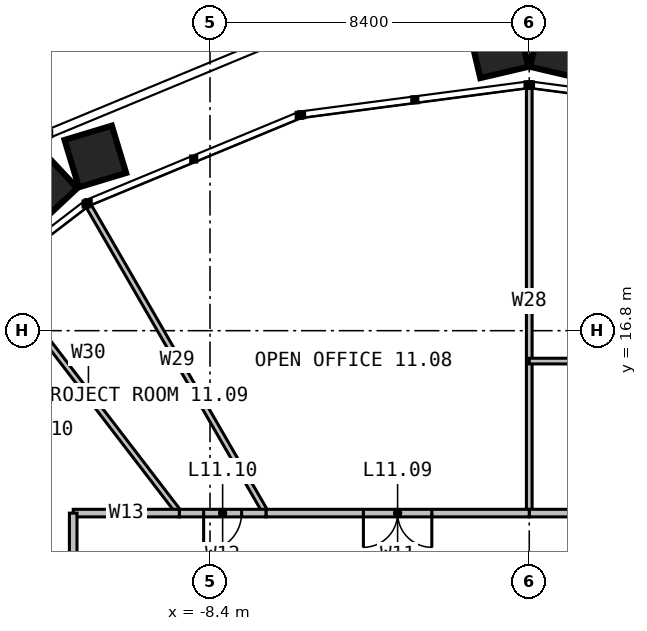
"""IFC4 building model, lengths in metres.
Left out: names, types, materials, properties, quantities, classifications, styles, units other than length and angle.
Written with IfcOpenShell. Run it as: python <this file> out.ifc"""

import sys

from ifc_helpers import new_model, si_unit, direction, frame, frame_2d, origin, place, context, subcontext, project, spatial, rectangle, extrude, element, fill, save


model = new_model("IFC4")
c1 = context("Model", 3, precision=1e-05, world=origin(), true_north=direction((0.0, 1.0)))
c2 = subcontext(c1, "Body", "Model", "MODEL_VIEW")
j1 = project(units=[si_unit("LENGTHUNIT", "METRE"), si_unit("PLANEANGLEUNIT", "RADIAN")], contexts=[c1])
p1 = place(None, origin())
s1 = spatial("IfcSite", under=j1, at=p1, CompositionType="ELEMENT")
p2 = place(p1, origin())
s2 = spatial("IfcBuilding", under=s1, at=p2, CompositionType="ELEMENT")
p3 = place(p2, frame((0.0, 0.0, 49.0)))
s3 = spatial("IfcBuildingStorey", under=s2, at=p3, CompositionType="ELEMENT", Elevation=49.0)
p4 = place(p3, frame((0.0, 12.0, 0.0), z_axis=(0.0, 0.0, 1.0), x_axis=(0.0, 1.0, 0.0)))
e1 = element("IfcWall", 1, at=p4, inside=s3, PredefinedType="PARTITIONING", context=c2, shape_type="SweptSolid", body=[
    extrude(rectangle(XDim=11.18, YDim=0.15, at=frame_2d((5.59, 0.0))), origin(), (0.0, 0.0, 1.0), 2.79),
])
p5 = place(p3, frame((-6.928, 12.0, 0.0), z_axis=(0.0, 0.0, 1.0), x_axis=(-0.499994446179, 0.866028610261, 0.0)))
e2 = element("IfcWall", 2, at=p5, inside=s3, PredefinedType="PARTITIONING", context=c2, shape_type="SweptSolid", body=[
    extrude(rectangle(XDim=9.324, YDim=0.15, at=frame_2d((4.662, 0.0))), origin(), (0.0, 0.0, 1.0), 2.79),
])
p6 = place(p3, frame((-9.208, 12.0, 0.0), z_axis=(0.0, 0.0, 1.0), x_axis=(-0.60875965539, 0.793354701233, 0.0)))
e3 = element("IfcWall", 3, at=p6, inside=s3, PredefinedType="PARTITIONING", context=c2, shape_type="SweptSolid", body=[
    extrude(rectangle(XDim=7.856, YDim=0.15, at=frame_2d((3.928, 0.0))), origin(), (0.0, 0.0, 1.0), 2.79),
])
p7 = place(p3, frame((-12.0, 6.928, 0.0), z_axis=(0.0, 0.0, 1.0), x_axis=(-0.866028610261, 0.499994446179, 0.0)))
e4 = element("IfcWall", 4, at=p7, inside=s3, PredefinedType="PARTITIONING", context=c2, shape_type="SweptSolid", body=[
    extrude(rectangle(XDim=9.324, YDim=0.15, at=frame_2d((4.662, 0.0))), origin(), (0.0, 0.0, 1.0), 2.79),
])
p8 = place(p3, frame((9.238, 16.0, 0.0), z_axis=(0.0, 0.0, 1.0), x_axis=(-1.0, 0.0, 0.0)))
e5 = element("IfcWall", 5, at=p8, inside=s3, PredefinedType="PARTITIONING", context=c2, shape_type="SweptSolid", body=[
    extrude(rectangle(XDim=9.238, YDim=0.15, at=frame_2d((4.619, 0.0))), origin(), (0.0, 0.0, 1.0), 2.79),
])
p9 = place(p8, frame((3.719, 0.0, 0.0)))
e6 = element("IfcOpeningElement", 6, at=p9, cuts=e5, PredefinedType="OPENING", context=c2, shape_type="SweptSolid", body=[
    extrude(rectangle(XDim=1.8, YDim=2.2, at=frame_2d((0.9, 1.1))), frame((0.0, 0.085, 0.0), z_axis=(0.0, -1.0, 0.0), x_axis=(1.0, 0.0, 0.0)), (0.0, 0.0, 1.0), 0.17),
])
p10 = place(p3, frame((6.928, 12.0, 0.0), z_axis=(0.0, 0.0, 1.0), x_axis=(-1.0, 0.0, 0.0)))
e7 = element("IfcWall", 7, at=p10, inside=s3, PredefinedType="PARTITIONING", context=c2, shape_type="SweptSolid", body=[
    extrude(rectangle(XDim=6.928, YDim=0.2, at=frame_2d((3.464, 0.0))), origin(), (0.0, 0.0, 1.0), 3.8),
])
p11 = place(p10, frame((2.964, 0.0, 0.0)))
e8 = element("IfcOpeningElement", 8, at=p11, cuts=e7, PredefinedType="OPENING", context=c2, shape_type="SweptSolid", body=[
    extrude(rectangle(XDim=1.0, YDim=2.2, at=frame_2d((0.5, 1.1))), frame((0.0, 0.11, 0.0), z_axis=(0.0, -1.0, 0.0), x_axis=(1.0, 0.0, 0.0)), (0.0, 0.0, 1.0), 0.22),
])
p12 = place(p3, frame((0.0, 12.0, 0.0), z_axis=(0.0, 0.0, 1.0), x_axis=(-1.0, 0.0, 0.0)))
e9 = element("IfcWall", 9, at=p12, inside=s3, PredefinedType="PARTITIONING", context=c2, shape_type="SweptSolid", body=[
    extrude(rectangle(XDim=6.928, YDim=0.2, at=frame_2d((3.464, 0.0))), origin(), (0.0, 0.0, 1.0), 3.8),
])
p13 = place(p12, frame((2.564, 0.0, 0.0)))
e10 = element("IfcOpeningElement", 10, at=p13, cuts=e9, PredefinedType="OPENING", context=c2, shape_type="SweptSolid", body=[
    extrude(rectangle(XDim=1.8, YDim=2.2, at=frame_2d((0.9, 1.1))), frame((0.0, 0.11, 0.0), z_axis=(0.0, -1.0, 0.0), x_axis=(1.0, 0.0, 0.0)), (0.0, 0.0, 1.0), 0.22),
])
p14 = place(p3, frame((-6.928, 12.0, 0.0), z_axis=(0.0, 0.0, 1.0), x_axis=(-1.0, 0.0, 0.0)))
e11 = element("IfcWall", 11, at=p14, inside=s3, PredefinedType="PARTITIONING", context=c2, shape_type="SweptSolid", body=[
    extrude(rectangle(XDim=2.28, YDim=0.2, at=frame_2d((1.14, 0.0))), origin(), (0.0, 0.0, 1.0), 3.8),
])
p15 = place(p14, frame((0.64, 0.0, 0.0)))
e12 = element("IfcOpeningElement", 12, at=p15, cuts=e11, PredefinedType="OPENING", context=c2, shape_type="SweptSolid", body=[
    extrude(rectangle(XDim=1.0, YDim=2.2, at=frame_2d((0.5, 1.1))), frame((0.0, 0.11, 0.0), z_axis=(0.0, -1.0, 0.0), x_axis=(1.0, 0.0, 0.0)), (0.0, 0.0, 1.0), 0.22),
])
p16 = place(p3, frame((-9.208, 12.0, 0.0), z_axis=(0.0, 0.0, 1.0), x_axis=(-1.0, 0.0, 0.0)))
e13 = element("IfcWall", 13, at=p16, inside=s3, PredefinedType="PARTITIONING", context=c2, shape_type="SweptSolid", body=[
    extrude(rectangle(XDim=2.792, YDim=0.2, at=frame_2d((1.396, 0.0))), origin(), (0.0, 0.0, 1.0), 3.8),
])
p17 = place(p3, frame((-12.0, 12.0, 0.0), z_axis=(0.0, 0.0, 1.0), x_axis=(0.0, -1.0, 0.0)))
e14 = element("IfcWall", 14, at=p17, inside=s3, PredefinedType="PARTITIONING", context=c2, shape_type="SweptSolid", body=[
    extrude(rectangle(XDim=5.072, YDim=0.2, at=frame_2d((2.536, 0.0))), origin(), (0.0, 0.0, 1.0), 3.8),
])
p18 = place(p17, frame((2.036, 0.0, 0.0)))
e15 = element("IfcOpeningElement", 15, at=p18, cuts=e14, PredefinedType="OPENING", context=c2, shape_type="SweptSolid", body=[
    extrude(rectangle(XDim=1.0, YDim=2.2, at=frame_2d((0.5, 1.1))), frame((0.0, 0.11, 0.0), z_axis=(0.0, -1.0, 0.0), x_axis=(1.0, 0.0, 0.0)), (0.0, 0.0, 1.0), 0.22),
])
p19 = place(p13, origin())
e16 = element("IfcDoor", 16, at=p19, inside=s3, OperationType="DOUBLE_DOOR_SINGLE_SWING", PredefinedType="DOOR", context=c2, shape_type="SweptSolid", body=[
    extrude(rectangle(XDim=1.8, YDim=2.2, at=frame_2d((0.9, 1.1))), frame((0.0, 0.025, 0.0), z_axis=(0.0, -1.0, 0.0), x_axis=(1.0, 0.0, 0.0)), (0.0, 0.0, 1.0), 0.05),
])
fill(e10, e16)
p20 = place(p15, origin())
e17 = element("IfcDoor", 17, at=p20, inside=s3, OperationType="SINGLE_SWING_RIGHT", PredefinedType="DOOR", context=c2, shape_type="SweptSolid", body=[
    extrude(rectangle(XDim=1.0, YDim=2.2, at=frame_2d((0.5, 1.1))), frame((0.0, 0.025, 0.0), z_axis=(0.0, -1.0, 0.0), x_axis=(1.0, 0.0, 0.0)), (0.0, 0.0, 1.0), 0.05),
])
fill(e12, e17)
save(model, sys.argv[1])
